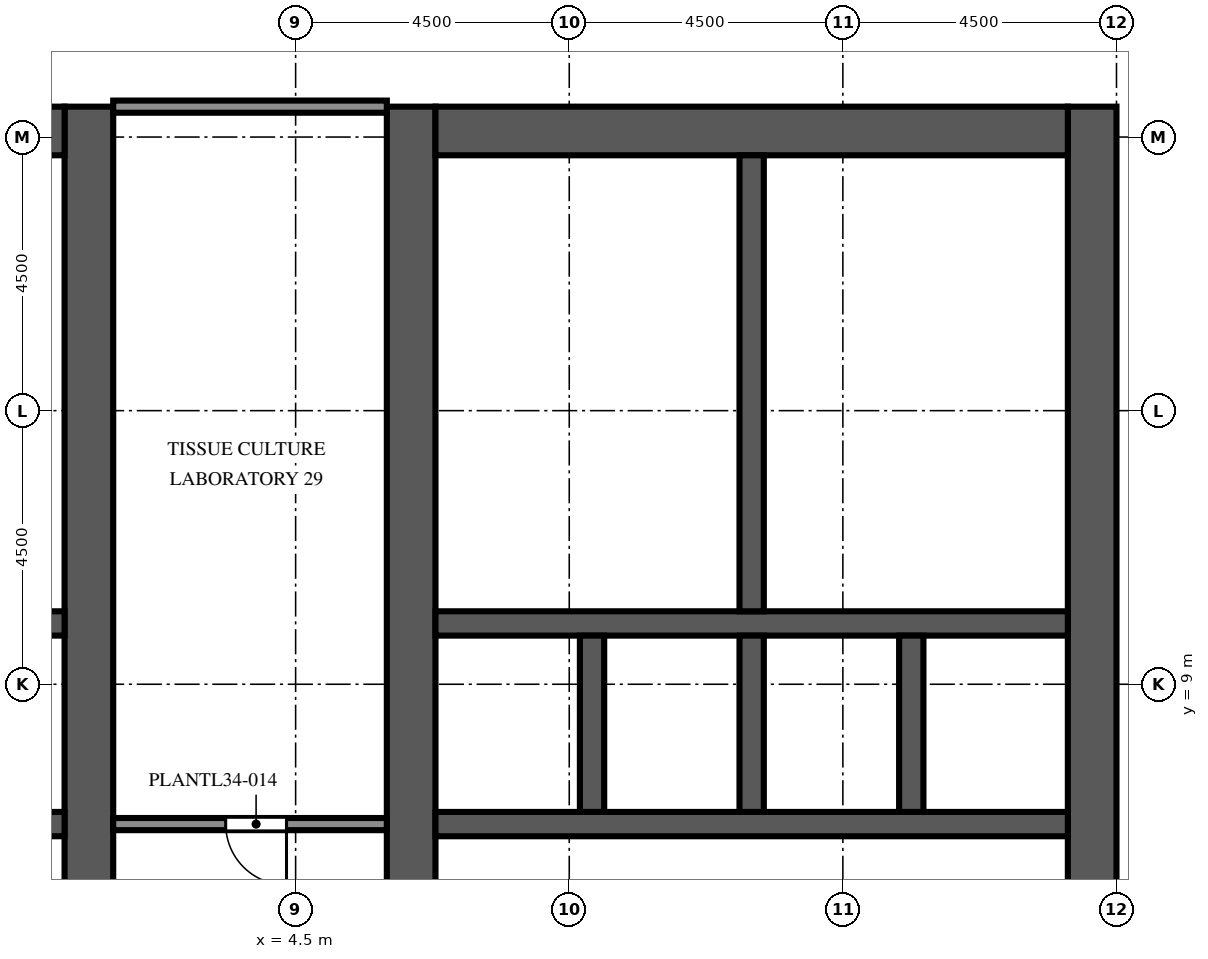
"""IFC4 building model, lengths in metres.
Left out: names, types, materials, properties, quantities, classifications, styles, units other than length and angle.
Written with IfcOpenShell. Run it as: python <this file> out.ifc"""

import sys

from ifc_helpers import new_model, si_unit, direction, frame, frame_2d, origin, place, context, subcontext, project, spatial, rectangle, extrude, element, fill, save


model = new_model("IFC4")
c1 = context("Model", 3, precision=1e-05, world=origin(), true_north=direction((0.0, 1.0)))
c2 = subcontext(c1, "Body", "Model", "MODEL_VIEW")
j1 = project(units=[si_unit("LENGTHUNIT", "METRE"), si_unit("PLANEANGLEUNIT", "RADIAN")], contexts=[c1])
p1 = place(None, origin())
s1 = spatial("IfcSite", under=j1, at=p1, CompositionType="ELEMENT")
p2 = place(p1, origin())
s2 = spatial("IfcBuilding", under=s1, at=p2, CompositionType="ELEMENT")
p3 = place(p2, frame((0.0, 0.0, 151.4)))
s3 = spatial("IfcBuildingStorey", under=s2, at=p3, CompositionType="ELEMENT", Elevation=151.4)
p4 = place(p3, frame((1.1, -9.0, 0.0), z_axis=(0.0, 0.0, 1.0), x_axis=(0.0, 1.0, 0.0)))
e1 = element("IfcWall", 1, at=p4, inside=s3, PredefinedType="SHEAR", context=c2, shape_type="SweptSolid", body=[
    extrude(rectangle(XDim=27.5, YDim=0.8, at=frame_2d((13.75, 0.0))), origin(), (0.0, 0.0, 1.0), 5.4),
])
p5 = place(p4, frame((12.55, 0.0, 0.0)))
e2 = element("IfcOpeningElement", 2, at=p5, cuts=e1, PredefinedType="OPENING", context=c2, shape_type="SweptSolid", body=[
    extrude(rectangle(XDim=2.4, YDim=2.4, at=frame_2d((1.2, 1.2))), frame((0.0, 0.41, 0.0), z_axis=(0.0, -1.0, 0.0), x_axis=(1.0, 0.0, 0.0)), (0.0, 0.0, 1.0), 0.82),
])
p6 = place(p4, frame((5.45, 0.0, 0.0)))
e3 = element("IfcOpeningElement", 3, at=p6, cuts=e1, PredefinedType="OPENING", context=c2, shape_type="SweptSolid", body=[
    extrude(rectangle(XDim=1.2, YDim=2.1, at=frame_2d((0.6, 1.05))), frame((0.0, 0.41, 0.0), z_axis=(0.0, -1.0, 0.0), x_axis=(1.0, 0.0, 0.0)), (0.0, 0.0, 1.0), 0.82),
])
p7 = place(p4, frame((19.45, 0.0, 0.0)))
e4 = element("IfcOpeningElement", 4, at=p7, cuts=e1, PredefinedType="OPENING", context=c2, shape_type="SweptSolid", body=[
    extrude(rectangle(XDim=1.0, YDim=2.1, at=frame_2d((0.5, 1.05))), frame((0.0, 0.41, 0.0), z_axis=(0.0, -1.0, 0.0), x_axis=(1.0, 0.0, 0.0)), (0.0, 0.0, 1.0), 0.82),
])
p8 = place(p4, frame((21.137, 0.0, 0.0)))
e5 = element("IfcOpeningElement", 5, at=p8, cuts=e1, PredefinedType="OPENING", context=c2, shape_type="SweptSolid", body=[
    extrude(rectangle(XDim=1.0, YDim=2.1, at=frame_2d((0.5, 1.05))), frame((0.0, 0.41, 0.0), z_axis=(0.0, -1.0, 0.0), x_axis=(1.0, 0.0, 0.0)), (0.0, 0.0, 1.0), 0.82),
])
p9 = place(p4, frame((23.2, 0.0, 0.0)))
e6 = element("IfcOpeningElement", 6, at=p9, cuts=e1, PredefinedType="OPENING", context=c2, shape_type="SweptSolid", body=[
    extrude(rectangle(XDim=1.0, YDim=2.1, at=frame_2d((0.5, 1.05))), frame((0.0, 0.41, 0.0), z_axis=(0.0, -1.0, 0.0), x_axis=(1.0, 0.0, 0.0)), (0.0, 0.0, 1.0), 0.82),
])
p10 = place(p4, frame((25.262, 0.0, 0.0)))
e7 = element("IfcOpeningElement", 7, at=p10, cuts=e1, PredefinedType="OPENING", context=c2, shape_type="SweptSolid", body=[
    extrude(rectangle(XDim=1.0, YDim=2.1, at=frame_2d((0.5, 1.05))), frame((0.0, 0.41, 0.0), z_axis=(0.0, -1.0, 0.0), x_axis=(1.0, 0.0, 0.0)), (0.0, 0.0, 1.0), 0.82),
])
p11 = place(p3, frame((-9.7, 18.1, 0.0), z_axis=(0.0, 0.0, 1.0), x_axis=(1.0, 0.0, 0.0)))
e8 = element("IfcWall", 8, at=p11, inside=s3, PredefinedType="SHEAR", context=c2, shape_type="SweptSolid", body=[
    extrude(rectangle(XDim=10.4, YDim=0.8, at=frame_2d((5.2, 0.0))), origin(), (0.0, 0.0, 1.0), 5.4),
])
p12 = place(p3, frame((-9.7, 6.7, 0.0), z_axis=(0.0, 0.0, 1.0), x_axis=(1.0, 0.0, 0.0)))
e9 = element("IfcWall", 9, at=p12, inside=s3, PredefinedType="SHEAR", context=c2, shape_type="SweptSolid", body=[
    extrude(rectangle(XDim=10.4, YDim=0.4, at=frame_2d((5.2, 0.0))), origin(), (0.0, 0.0, 1.0), 5.4),
])
p13 = place(p12, frame((3.337, 0.0, 0.0)))
e10 = element("IfcOpeningElement", 10, at=p13, cuts=e9, PredefinedType="OPENING", context=c2, shape_type="SweptSolid", body=[
    extrude(rectangle(XDim=1.1, YDim=2.1, at=frame_2d((0.55, 1.05))), frame((0.0, 0.21, 0.0), z_axis=(0.0, -1.0, 0.0), x_axis=(1.0, 0.0, 0.0)), (0.0, 0.0, 1.0), 0.42),
])
p14 = place(p12, frame((5.962, 0.0, 0.0)))
e11 = element("IfcOpeningElement", 11, at=p14, cuts=e9, PredefinedType="OPENING", context=c2, shape_type="SweptSolid", body=[
    extrude(rectangle(XDim=1.1, YDim=2.1, at=frame_2d((0.55, 1.05))), frame((0.0, 0.21, 0.0), z_axis=(0.0, -1.0, 0.0), x_axis=(1.0, 0.0, 0.0)), (0.0, 0.0, 1.0), 0.42),
])
p15 = place(p12, frame((8.663, 0.0, 0.0)))
e12 = element("IfcOpeningElement", 12, at=p15, cuts=e9, PredefinedType="OPENING", context=c2, shape_type="SweptSolid", body=[
    extrude(rectangle(XDim=1.1, YDim=2.1, at=frame_2d((0.55, 1.05))), frame((0.0, 0.21, 0.0), z_axis=(0.0, -1.0, 0.0), x_axis=(1.0, 0.0, 0.0)), (0.0, 0.0, 1.0), 0.42),
])
p16 = place(p12, frame((0.688, 0.0, 0.0)))
e13 = element("IfcOpeningElement", 13, at=p16, cuts=e9, PredefinedType="OPENING", context=c2, shape_type="SweptSolid", body=[
    extrude(rectangle(XDim=1.0, YDim=2.1, at=frame_2d((0.5, 1.05))), frame((0.0, 0.21, 0.0), z_axis=(0.0, -1.0, 0.0), x_axis=(1.0, 0.0, 0.0)), (0.0, 0.0, 1.0), 0.42),
])
p17 = place(p3, frame((-9.7, 10.0, 0.0), z_axis=(0.0, 0.0, 1.0), x_axis=(1.0, 0.0, 0.0)))
e14 = element("IfcWall", 14, at=p17, inside=s3, PredefinedType="SHEAR", context=c2, shape_type="SweptSolid", body=[
    extrude(rectangle(XDim=10.4, YDim=0.4, at=frame_2d((5.2, 0.0))), origin(), (0.0, 0.0, 1.0), 5.4),
])
p18 = place(p3, frame((6.4, -9.0, 0.0), z_axis=(0.0, 0.0, 1.0), x_axis=(0.0, 1.0, 0.0)))
e15 = element("IfcWall", 15, at=p18, inside=s3, PredefinedType="SHEAR", context=c2, shape_type="SweptSolid", body=[
    extrude(rectangle(XDim=27.5, YDim=0.8, at=frame_2d((13.75, 0.0))), origin(), (0.0, 0.0, 1.0), 5.4),
])
p19 = place(p18, frame((12.55, 0.0, 0.0)))
e16 = element("IfcOpeningElement", 16, at=p19, cuts=e15, PredefinedType="OPENING", context=c2, shape_type="SweptSolid", body=[
    extrude(rectangle(XDim=2.4, YDim=2.4, at=frame_2d((1.2, 1.2))), frame((0.0, 0.41, 0.0), z_axis=(0.0, -1.0, 0.0), x_axis=(1.0, 0.0, 0.0)), (0.0, 0.0, 1.0), 0.82),
])
p20 = place(p18, frame((5.45, 0.0, 0.0)))
e17 = element("IfcOpeningElement", 17, at=p20, cuts=e15, PredefinedType="OPENING", context=c2, shape_type="SweptSolid", body=[
    extrude(rectangle(XDim=1.2, YDim=2.1, at=frame_2d((0.6, 1.05))), frame((0.0, 0.41, 0.0), z_axis=(0.0, -1.0, 0.0), x_axis=(1.0, 0.0, 0.0)), (0.0, 0.0, 1.0), 0.82),
])
p21 = place(p18, frame((19.45, 0.0, 0.0)))
e18 = element("IfcOpeningElement", 18, at=p21, cuts=e15, PredefinedType="OPENING", context=c2, shape_type="SweptSolid", body=[
    extrude(rectangle(XDim=1.0, YDim=2.1, at=frame_2d((0.5, 1.05))), frame((0.0, 0.41, 0.0), z_axis=(0.0, -1.0, 0.0), x_axis=(1.0, 0.0, 0.0)), (0.0, 0.0, 1.0), 0.82),
])
p22 = place(p18, frame((21.137, 0.0, 0.0)))
e19 = element("IfcOpeningElement", 19, at=p22, cuts=e15, PredefinedType="OPENING", context=c2, shape_type="SweptSolid", body=[
    extrude(rectangle(XDim=1.0, YDim=2.1, at=frame_2d((0.5, 1.05))), frame((0.0, 0.41, 0.0), z_axis=(0.0, -1.0, 0.0), x_axis=(1.0, 0.0, 0.0)), (0.0, 0.0, 1.0), 0.82),
])
p23 = place(p18, frame((23.2, 0.0, 0.0)))
e20 = element("IfcOpeningElement", 20, at=p23, cuts=e15, PredefinedType="OPENING", context=c2, shape_type="SweptSolid", body=[
    extrude(rectangle(XDim=1.0, YDim=2.1, at=frame_2d((0.5, 1.05))), frame((0.0, 0.41, 0.0), z_axis=(0.0, -1.0, 0.0), x_axis=(1.0, 0.0, 0.0)), (0.0, 0.0, 1.0), 0.82),
])
p24 = place(p18, frame((25.262, 0.0, 0.0)))
e21 = element("IfcOpeningElement", 21, at=p24, cuts=e15, PredefinedType="OPENING", context=c2, shape_type="SweptSolid", body=[
    extrude(rectangle(XDim=1.0, YDim=2.1, at=frame_2d((0.5, 1.05))), frame((0.0, 0.41, 0.0), z_axis=(0.0, -1.0, 0.0), x_axis=(1.0, 0.0, 0.0)), (0.0, 0.0, 1.0), 0.82),
])
p25 = place(p3, frame((17.6, -9.0, 0.0), z_axis=(0.0, 0.0, 1.0), x_axis=(0.0, 1.0, 0.0)))
e22 = element("IfcWall", 22, at=p25, inside=s3, PredefinedType="SHEAR", context=c2, shape_type="SweptSolid", body=[
    extrude(rectangle(XDim=27.5, YDim=0.8, at=frame_2d((13.75, 0.0))), origin(), (0.0, 0.0, 1.0), 5.4),
])
p26 = place(p25, frame((12.55, 0.0, 0.0)))
e23 = element("IfcOpeningElement", 23, at=p26, cuts=e22, PredefinedType="OPENING", context=c2, shape_type="SweptSolid", body=[
    extrude(rectangle(XDim=2.4, YDim=2.4, at=frame_2d((1.2, 1.2))), frame((0.0, 0.41, 0.0), z_axis=(0.0, -1.0, 0.0), x_axis=(1.0, 0.0, 0.0)), (0.0, 0.0, 1.0), 0.82),
])
p27 = place(p25, frame((6.825, 0.0, 0.0)))
e24 = element("IfcOpeningElement", 24, at=p27, cuts=e22, PredefinedType="OPENING", context=c2, shape_type="SweptSolid", body=[
    extrude(rectangle(XDim=1.2, YDim=2.1, at=frame_2d((0.6, 1.05))), frame((0.0, 0.41, 0.0), z_axis=(0.0, -1.0, 0.0), x_axis=(1.0, 0.0, 0.0)), (0.0, 0.0, 1.0), 0.82),
])
p28 = place(p25, frame((19.475, 0.0, 0.0)))
e25 = element("IfcOpeningElement", 25, at=p28, cuts=e22, PredefinedType="OPENING", context=c2, shape_type="SweptSolid", body=[
    extrude(rectangle(XDim=1.2, YDim=2.1, at=frame_2d((0.6, 1.05))), frame((0.0, 0.41, 0.0), z_axis=(0.0, -1.0, 0.0), x_axis=(1.0, 0.0, 0.0)), (0.0, 0.0, 1.0), 0.82),
])
p29 = place(p3, frame((6.8, 18.1, 0.0), z_axis=(0.0, 0.0, 1.0), x_axis=(1.0, 0.0, 0.0)))
e26 = element("IfcWall", 26, at=p29, inside=s3, PredefinedType="SHEAR", context=c2, shape_type="SweptSolid", body=[
    extrude(rectangle(XDim=10.4, YDim=0.8, at=frame_2d((5.2, 0.0))), origin(), (0.0, 0.0, 1.0), 5.4),
])
p30 = place(p3, frame((6.8, 6.7, 0.0), z_axis=(0.0, 0.0, 1.0), x_axis=(1.0, 0.0, 0.0)))
e27 = element("IfcWall", 27, at=p30, inside=s3, PredefinedType="SHEAR", context=c2, shape_type="SweptSolid", body=[
    extrude(rectangle(XDim=10.4, YDim=0.4, at=frame_2d((5.2, 0.0))), origin(), (0.0, 0.0, 1.0), 5.4),
])
p31 = place(p30, frame((3.337, 0.0, 0.0)))
e28 = element("IfcOpeningElement", 28, at=p31, cuts=e27, PredefinedType="OPENING", context=c2, shape_type="SweptSolid", body=[
    extrude(rectangle(XDim=1.1, YDim=2.1, at=frame_2d((0.55, 1.05))), frame((0.0, 0.21, 0.0), z_axis=(0.0, -1.0, 0.0), x_axis=(1.0, 0.0, 0.0)), (0.0, 0.0, 1.0), 0.42),
])
p32 = place(p30, frame((5.962, 0.0, 0.0)))
e29 = element("IfcOpeningElement", 29, at=p32, cuts=e27, PredefinedType="OPENING", context=c2, shape_type="SweptSolid", body=[
    extrude(rectangle(XDim=1.1, YDim=2.1, at=frame_2d((0.55, 1.05))), frame((0.0, 0.21, 0.0), z_axis=(0.0, -1.0, 0.0), x_axis=(1.0, 0.0, 0.0)), (0.0, 0.0, 1.0), 0.42),
])
p33 = place(p30, frame((8.663, 0.0, 0.0)))
e30 = element("IfcOpeningElement", 30, at=p33, cuts=e27, PredefinedType="OPENING", context=c2, shape_type="SweptSolid", body=[
    extrude(rectangle(XDim=1.1, YDim=2.1, at=frame_2d((0.55, 1.05))), frame((0.0, 0.21, 0.0), z_axis=(0.0, -1.0, 0.0), x_axis=(1.0, 0.0, 0.0)), (0.0, 0.0, 1.0), 0.42),
])
p34 = place(p30, frame((0.688, 0.0, 0.0)))
e31 = element("IfcOpeningElement", 31, at=p34, cuts=e27, PredefinedType="OPENING", context=c2, shape_type="SweptSolid", body=[
    extrude(rectangle(XDim=1.0, YDim=2.1, at=frame_2d((0.5, 1.05))), frame((0.0, 0.21, 0.0), z_axis=(0.0, -1.0, 0.0), x_axis=(1.0, 0.0, 0.0)), (0.0, 0.0, 1.0), 0.42),
])
p35 = place(p3, frame((6.8, 10.0, 0.0), z_axis=(0.0, 0.0, 1.0), x_axis=(1.0, 0.0, 0.0)))
e32 = element("IfcWall", 32, at=p35, inside=s3, PredefinedType="SHEAR", context=c2, shape_type="SweptSolid", body=[
    extrude(rectangle(XDim=10.4, YDim=0.4, at=frame_2d((5.2, 0.0))), origin(), (0.0, 0.0, 1.0), 5.4),
])
for number, where, z_axis, x_axis in (
    (33, (9.375, 6.9, 0.0), (0.0, 0.0, 1.0), (0.0, 1.0, 0.0)),
    (34, (12.0, 6.9, 0.0), (0.0, 0.0, 1.0), (0.0, 1.0, 0.0)),
    (35, (14.625, 6.9, 0.0), (0.0, 0.0, 1.0), (0.0, 1.0, 0.0)),
):
    element("IfcWall", number, at=place(p3, frame(where, z_axis=z_axis, x_axis=x_axis)), inside=s3, PredefinedType="SHEAR", context=c2, shape_type="SweptSolid", body=[
        extrude(rectangle(XDim=2.9, YDim=0.4, at=frame_2d((1.45, 0.0))), origin(), (0.0, 0.0, 1.0), 5.4),
    ])
p36 = place(p3, frame((12.0, 10.2, 0.0), z_axis=(0.0, 0.0, 1.0), x_axis=(0.0, 1.0, 0.0)))
e36 = element("IfcWall", 36, at=p36, inside=s3, PredefinedType="SHEAR", context=c2, shape_type="SweptSolid", body=[
    extrude(rectangle(XDim=7.5, YDim=0.4, at=frame_2d((3.75, 0.0))), origin(), (0.0, 0.0, 1.0), 5.4),
])
for number, where, z_axis, x_axis in (
    (37, (-4.3, 11.7, 0.0), (0.0, 0.0, 1.0), (1.0, 0.0, 0.0)),
    (38, (-4.3, 13.575, 0.0), (0.0, 0.0, 1.0), (1.0, 0.0, 0.0)),
    (39, (-4.3, 15.825, 0.0), (0.0, 0.0, 1.0), (1.0, 0.0, 0.0)),
    (40, (6.8, 11.7, 0.0), (0.0, 0.0, 1.0), (1.0, 0.0, 0.0)),
    (41, (6.8, 13.575, 0.0), (0.0, 0.0, 1.0), (1.0, 0.0, 0.0)),
    (42, (6.8, 15.825, 0.0), (0.0, 0.0, 1.0), (1.0, 0.0, 0.0)),
):
    element("IfcWall", number, at=place(p3, frame(where, z_axis=z_axis, x_axis=x_axis)), inside=s3, PredefinedType="PARTITIONING", context=c2, shape_type="SweptSolid", body=[
        extrude(rectangle(XDim=5.0, YDim=0.1, at=frame_2d((2.5, 0.0))), origin(), (0.0, 0.0, 1.0), 4.95),
    ])
p37 = place(p3, frame((1.5, 6.7, 0.0), z_axis=(0.0, 0.0, 1.0), x_axis=(1.0, 0.0, 0.0)))
e43 = element("IfcWall", 43, at=p37, inside=s3, PredefinedType="PARTITIONING", context=c2, shape_type="SweptSolid", body=[
    extrude(rectangle(XDim=4.5, YDim=0.2, at=frame_2d((2.25, 0.0))), origin(), (0.0, 0.0, 1.0), 4.95),
])
p38 = place(p37, frame((1.85, 0.0, 0.0)))
e44 = element("IfcOpeningElement", 44, at=p38, cuts=e43, PredefinedType="OPENING", context=c2, shape_type="SweptSolid", body=[
    extrude(rectangle(XDim=1.0, YDim=2.1, at=frame_2d((0.5, 1.05))), frame((0.0, 0.11, 0.0), z_axis=(0.0, -1.0, 0.0), x_axis=(1.0, 0.0, 0.0)), (0.0, 0.0, 1.0), 0.22),
])
p39 = place(p3, frame((1.5, 18.5, 0.0), z_axis=(0.0, 0.0, 1.0), x_axis=(1.0, 0.0, 0.0)))
e45 = element("IfcWall", 45, at=p39, inside=s3, PredefinedType="PARTITIONING", context=c2, shape_type="SweptSolid", body=[
    extrude(rectangle(XDim=4.5, YDim=0.2, at=frame_2d((2.25, 0.0))), origin(), (0.0, 0.0, 1.0), 4.95),
])
p40 = place(p31, origin())
e46 = element("IfcDoor", 46, at=p40, inside=s3, OperationType="DOUBLE_DOOR_SLIDING", PredefinedType="DOOR", context=c2, shape_type="SweptSolid", body=[
    extrude(rectangle(XDim=1.1, YDim=2.1, at=frame_2d((0.55, 1.05))), frame((0.0, 0.025, 0.0), z_axis=(0.0, -1.0, 0.0), x_axis=(1.0, 0.0, 0.0)), (0.0, 0.0, 1.0), 0.05),
])
fill(e28, e46)
p41 = place(p32, origin())
e47 = element("IfcDoor", 47, at=p41, inside=s3, OperationType="DOUBLE_DOOR_SLIDING", PredefinedType="DOOR", context=c2, shape_type="SweptSolid", body=[
    extrude(rectangle(XDim=1.1, YDim=2.1, at=frame_2d((0.55, 1.05))), frame((0.0, 0.025, 0.0), z_axis=(0.0, -1.0, 0.0), x_axis=(1.0, 0.0, 0.0)), (0.0, 0.0, 1.0), 0.05),
])
fill(e29, e47)
p42 = place(p33, origin())
e48 = element("IfcDoor", 48, at=p42, inside=s3, OperationType="DOUBLE_DOOR_SLIDING", PredefinedType="DOOR", context=c2, shape_type="SweptSolid", body=[
    extrude(rectangle(XDim=1.1, YDim=2.1, at=frame_2d((0.55, 1.05))), frame((0.0, 0.025, 0.0), z_axis=(0.0, -1.0, 0.0), x_axis=(1.0, 0.0, 0.0)), (0.0, 0.0, 1.0), 0.05),
])
fill(e30, e48)
p43 = place(p5, origin())
e49 = element("IfcDoor", 49, at=p43, inside=s3, OperationType="DOUBLE_DOOR_DOUBLE_SWING", PredefinedType="DOOR", context=c2, shape_type="SweptSolid", body=[
    extrude(rectangle(XDim=2.4, YDim=2.4, at=frame_2d((1.2, 1.2))), frame((0.0, 0.025, 0.0), z_axis=(0.0, -1.0, 0.0), x_axis=(1.0, 0.0, 0.0)), (0.0, 0.0, 1.0), 0.05),
])
fill(e2, e49)
p44 = place(p19, origin())
e50 = element("IfcDoor", 50, at=p44, inside=s3, OperationType="DOUBLE_DOOR_DOUBLE_SWING", PredefinedType="DOOR", context=c2, shape_type="SweptSolid", body=[
    extrude(rectangle(XDim=2.4, YDim=2.4, at=frame_2d((1.2, 1.2))), frame((0.0, 0.025, 0.0), z_axis=(0.0, -1.0, 0.0), x_axis=(1.0, 0.0, 0.0)), (0.0, 0.0, 1.0), 0.05),
])
fill(e16, e50)
p45 = place(p26, origin())
e51 = element("IfcDoor", 51, at=p45, inside=s3, OperationType="DOUBLE_DOOR_DOUBLE_SWING", PredefinedType="DOOR", context=c2, shape_type="SweptSolid", body=[
    extrude(rectangle(XDim=2.4, YDim=2.4, at=frame_2d((1.2, 1.2))), frame((0.0, 0.025, 0.0), z_axis=(0.0, -1.0, 0.0), x_axis=(1.0, 0.0, 0.0)), (0.0, 0.0, 1.0), 0.05),
])
fill(e23, e51)
p46 = place(p28, frame((1.2, 0.0, 0.0), z_axis=(0.0, 0.0, 1.0), x_axis=(-1.0, 0.0, 0.0)))
e52 = element("IfcDoor", 52, at=p46, inside=s3, OperationType="SINGLE_SWING_LEFT", PredefinedType="DOOR", context=c2, shape_type="SweptSolid", body=[
    extrude(rectangle(XDim=1.2, YDim=2.1, at=frame_2d((0.6, 1.05))), frame((0.0, 0.025, 0.0), z_axis=(0.0, -1.0, 0.0), x_axis=(1.0, 0.0, 0.0)), (0.0, 0.0, 1.0), 0.05),
])
fill(e25, e52)
p47 = place(p7, origin())
e53 = element("IfcDoor", 53, at=p47, inside=s3, OperationType="SINGLE_SWING_LEFT", PredefinedType="DOOR", context=c2, shape_type="SweptSolid", body=[
    extrude(rectangle(XDim=1.0, YDim=2.1, at=frame_2d((0.5, 1.05))), frame((0.0, 0.375, 0.0), z_axis=(0.0, -1.0, 0.0), x_axis=(1.0, 0.0, 0.0)), (0.0, 0.0, 1.0), 0.05),
])
fill(e4, e53)
p48 = place(p8, origin())
e54 = element("IfcDoor", 54, at=p48, inside=s3, OperationType="SINGLE_SWING_RIGHT", PredefinedType="DOOR", context=c2, shape_type="SweptSolid", body=[
    extrude(rectangle(XDim=1.0, YDim=2.1, at=frame_2d((0.5, 1.05))), frame((0.0, 0.375, 0.0), z_axis=(0.0, -1.0, 0.0), x_axis=(1.0, 0.0, 0.0)), (0.0, 0.0, 1.0), 0.05),
])
fill(e5, e54)
p49 = place(p9, origin())
e55 = element("IfcDoor", 55, at=p49, inside=s3, OperationType="SINGLE_SWING_LEFT", PredefinedType="DOOR", context=c2, shape_type="SweptSolid", body=[
    extrude(rectangle(XDim=1.0, YDim=2.1, at=frame_2d((0.5, 1.05))), frame((0.0, 0.375, 0.0), z_axis=(0.0, -1.0, 0.0), x_axis=(1.0, 0.0, 0.0)), (0.0, 0.0, 1.0), 0.05),
])
fill(e6, e55)
p50 = place(p10, origin())
e56 = element("IfcDoor", 56, at=p50, inside=s3, OperationType="SINGLE_SWING_RIGHT", PredefinedType="DOOR", context=c2, shape_type="SweptSolid", body=[
    extrude(rectangle(XDim=1.0, YDim=2.1, at=frame_2d((0.5, 1.05))), frame((0.0, 0.375, 0.0), z_axis=(0.0, -1.0, 0.0), x_axis=(1.0, 0.0, 0.0)), (0.0, 0.0, 1.0), 0.05),
])
fill(e7, e56)
p51 = place(p34, origin())
e57 = element("IfcDoor", 57, at=p51, inside=s3, OperationType="SINGLE_SWING_LEFT", PredefinedType="DOOR", context=c2, shape_type="SweptSolid", body=[
    extrude(rectangle(XDim=1.0, YDim=2.1, at=frame_2d((0.5, 1.05))), frame((0.0, 0.025, 0.0), z_axis=(0.0, -1.0, 0.0), x_axis=(1.0, 0.0, 0.0)), (0.0, 0.0, 1.0), 0.05),
])
fill(e31, e57)
p52 = place(p21, origin())
e58 = element("IfcDoor", 58, at=p52, inside=s3, OperationType="SINGLE_SWING_RIGHT", PredefinedType="DOOR", context=c2, shape_type="SweptSolid", body=[
    extrude(rectangle(XDim=1.0, YDim=2.1, at=frame_2d((0.5, 1.05))), frame((0.0, -0.325, 0.0), z_axis=(0.0, -1.0, 0.0), x_axis=(1.0, 0.0, 0.0)), (0.0, 0.0, 1.0), 0.05),
])
fill(e18, e58)
p53 = place(p22, origin())
e59 = element("IfcDoor", 59, at=p53, inside=s3, OperationType="SINGLE_SWING_LEFT", PredefinedType="DOOR", context=c2, shape_type="SweptSolid", body=[
    extrude(rectangle(XDim=1.0, YDim=2.1, at=frame_2d((0.5, 1.05))), frame((0.0, -0.325, 0.0), z_axis=(0.0, -1.0, 0.0), x_axis=(1.0, 0.0, 0.0)), (0.0, 0.0, 1.0), 0.05),
])
fill(e19, e59)
p54 = place(p23, origin())
e60 = element("IfcDoor", 60, at=p54, inside=s3, OperationType="SINGLE_SWING_RIGHT", PredefinedType="DOOR", context=c2, shape_type="SweptSolid", body=[
    extrude(rectangle(XDim=1.0, YDim=2.1, at=frame_2d((0.5, 1.05))), frame((0.0, -0.325, 0.0), z_axis=(0.0, -1.0, 0.0), x_axis=(1.0, 0.0, 0.0)), (0.0, 0.0, 1.0), 0.05),
])
fill(e20, e60)
p55 = place(p24, origin())
e61 = element("IfcDoor", 61, at=p55, inside=s3, OperationType="SINGLE_SWING_LEFT", PredefinedType="DOOR", context=c2, shape_type="SweptSolid", body=[
    extrude(rectangle(XDim=1.0, YDim=2.1, at=frame_2d((0.5, 1.05))), frame((0.0, -0.325, 0.0), z_axis=(0.0, -1.0, 0.0), x_axis=(1.0, 0.0, 0.0)), (0.0, 0.0, 1.0), 0.05),
])
fill(e21, e61)
p56 = place(p38, origin())
e62 = element("IfcDoor", 62, at=p56, inside=s3, OperationType="SINGLE_SWING_RIGHT", PredefinedType="DOOR", context=c2, shape_type="SweptSolid", body=[
    extrude(rectangle(XDim=1.0, YDim=2.1, at=frame_2d((0.5, 1.05))), frame((0.0, 0.025, 0.0), z_axis=(0.0, -1.0, 0.0), x_axis=(1.0, 0.0, 0.0)), (0.0, 0.0, 1.0), 0.05),
])
fill(e44, e62)
save(model, sys.argv[1])
